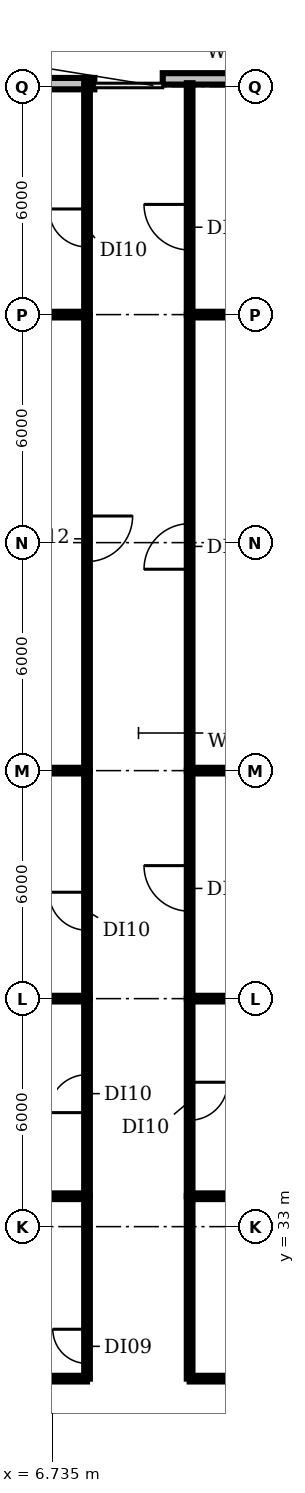
"""IFC4 building model, lengths in metres.
Left out: names, types, materials, properties, quantities, classifications, styles, units other than length and angle.
Written with IfcOpenShell. Run it as: python <this file> out.ifc"""

import sys

from ifc_helpers import new_model, si_unit, direction, frame, frame_2d, origin, place, context, subcontext, project, spatial, rectangle, extrude, element, fill, save


model = new_model("IFC4")
c1 = context("Model", 3, precision=1e-05, world=origin(), true_north=direction((0.0, 1.0)))
c2 = subcontext(c1, "Body", "Model", "MODEL_VIEW")
j1 = project(units=[si_unit("LENGTHUNIT", "METRE"), si_unit("PLANEANGLEUNIT", "RADIAN")], contexts=[c1])
p1 = place(None, origin())
s1 = spatial("IfcSite", under=j1, at=p1, CompositionType="ELEMENT")
p2 = place(p1, origin())
s2 = spatial("IfcBuilding", under=s1, at=p2, CompositionType="ELEMENT")
p3 = place(p2, frame((0.0, 0.0, 264.2)))
s3 = spatial("IfcBuildingStorey", under=s2, at=p3, CompositionType="ELEMENT", Elevation=264.2)
p4 = place(p3, frame((14.357, 63.204, 0.0), z_axis=(0.0, 0.0, 1.0), x_axis=(-1.0, 0.0, 0.0)))
e1 = element("IfcWall", 1, at=p4, inside=s3, PredefinedType="SOLIDWALL", context=c2, shape_type="SweptSolid", body=[
    extrude(rectangle(XDim=4.715, YDim=0.3, at=frame_2d((2.357, 0.0))), origin(), (0.0, 0.0, 1.0), 3.85),
])
p5 = place(p3, frame((7.843, 63.078, 0.0), z_axis=(0.0, 0.0, 1.0), x_axis=(-1.0, 0.0, 0.0)))
e2 = element("IfcWall", 2, at=p5, inside=s3, PredefinedType="SOLIDWALL", context=c2, shape_type="SweptSolid", body=[
    extrude(rectangle(XDim=8.873, YDim=0.3, at=frame_2d((4.436, 0.0))), origin(), (0.0, 0.0, 1.0), 3.85),
])
for number, where, z_axis, x_axis in (
    (3, (-0.98, 33.8, 0.0), (0.0, 0.0, 1.0), (1.0, 0.0, 0.0)),
    (4, (-0.98, 39.0, 0.0), (0.0, 0.0, 1.0), (1.0, 0.0, 0.0)),
    (5, (-0.98, 45.0, 0.0), (0.0, 0.0, 1.0), (1.0, 0.0, 0.0)),
    (6, (-0.98, 57.0, 0.0), (0.0, 0.0, 1.0), (1.0, 0.0, 0.0)),
):
    element("IfcWall", number, at=place(p3, frame(where, z_axis=z_axis, x_axis=x_axis)), inside=s3, PredefinedType="PARTITIONING", context=c2, shape_type="SweptSolid", body=[
        extrude(rectangle(XDim=8.63, YDim=0.15, at=frame_2d((4.315, 0.0))), origin(), (0.0, 0.0, 1.0), 2.9),
    ])
p6 = place(p3, frame((3.0, 29.0, 0.0), z_axis=(0.0, 0.0, 1.0), x_axis=(1.0, 0.0, 0.0)))
e7 = element("IfcWall", 7, at=p6, inside=s3, PredefinedType="PARTITIONING", context=c2, shape_type="SweptSolid", body=[
    extrude(rectangle(XDim=4.65, YDim=0.15, at=frame_2d((2.325, 0.0))), origin(), (0.0, 0.0, 1.0), 2.9),
])
p7 = place(p3, frame((7.65, 29.0, 0.0), z_axis=(0.0, 0.0, 1.0), x_axis=(0.0, 1.0, 0.0)))
e8 = element("IfcWall", 8, at=p7, inside=s3, PredefinedType="PARTITIONING", context=c2, shape_type="SweptSolid", body=[
    extrude(rectangle(XDim=4.8, YDim=0.15, at=frame_2d((2.4, 0.0))), origin(), (0.0, 0.0, 1.0), 2.9),
])
p8 = place(p7, frame((0.4, 0.0, 0.0)))
e9 = element("IfcOpeningElement", 9, at=p8, cuts=e8, PredefinedType="OPENING", context=c2, shape_type="SweptSolid", body=[
    extrude(rectangle(XDim=0.9, YDim=2.1, at=frame_2d((0.45, 1.05))), frame((0.0, 0.085, 0.0), z_axis=(0.0, -1.0, 0.0), x_axis=(1.0, 0.0, 0.0)), (0.0, 0.0, 1.0), 0.17),
])
p9 = place(p3, frame((7.65, 33.8, 0.0), z_axis=(0.0, 0.0, 1.0), x_axis=(0.0, 1.0, 0.0)))
e10 = element("IfcWall", 10, at=p9, inside=s3, PredefinedType="PARTITIONING", context=c2, shape_type="SweptSolid", body=[
    extrude(rectangle(XDim=5.2, YDim=0.15, at=frame_2d((2.6, 0.0))), origin(), (0.0, 0.0, 1.0), 2.9),
])
p10 = place(p9, frame((2.2, 0.0, 0.0)))
e11 = element("IfcOpeningElement", 11, at=p10, cuts=e10, PredefinedType="OPENING", context=c2, shape_type="SweptSolid", body=[
    extrude(rectangle(XDim=1.0, YDim=2.1, at=frame_2d((0.5, 1.05))), frame((0.0, 0.085, 0.0), z_axis=(0.0, -1.0, 0.0), x_axis=(1.0, 0.0, 0.0)), (0.0, 0.0, 1.0), 0.17),
])
p11 = place(p3, frame((7.65, 39.0, 0.0), z_axis=(0.0, 0.0, 1.0), x_axis=(0.0, 1.0, 0.0)))
e12 = element("IfcWall", 12, at=p11, inside=s3, PredefinedType="PARTITIONING", context=c2, shape_type="SweptSolid", body=[
    extrude(rectangle(XDim=6.0, YDim=0.15, at=frame_2d((3.0, 0.0))), origin(), (0.0, 0.0, 1.0), 2.9),
])
p12 = place(p11, frame((1.8, 0.0, 0.0)))
e13 = element("IfcOpeningElement", 13, at=p12, cuts=e12, PredefinedType="OPENING", context=c2, shape_type="SweptSolid", body=[
    extrude(rectangle(XDim=1.0, YDim=2.1, at=frame_2d((0.5, 1.05))), frame((0.0, 0.085, 0.0), z_axis=(0.0, -1.0, 0.0), x_axis=(1.0, 0.0, 0.0)), (0.0, 0.0, 1.0), 0.17),
])
p13 = place(p3, frame((7.65, 57.0, 0.0), z_axis=(0.0, 0.0, 1.0), x_axis=(0.0, -1.0, 0.0)))
e14 = element("IfcWall", 14, at=p13, inside=s3, PredefinedType="PARTITIONING", context=c2, shape_type="SweptSolid", body=[
    extrude(rectangle(XDim=12.0, YDim=0.15, at=frame_2d((6.0, 0.0))), origin(), (0.0, 0.0, 1.0), 2.9),
])
p14 = place(p13, frame((5.3, 0.0, 0.0)))
e15 = element("IfcOpeningElement", 15, at=p14, cuts=e14, PredefinedType="OPENING", context=c2, shape_type="SweptSolid", body=[
    extrude(rectangle(XDim=1.2, YDim=2.1, at=frame_2d((0.6, 1.05))), frame((0.0, 0.085, 0.0), z_axis=(0.0, -1.0, 0.0), x_axis=(1.0, 0.0, 0.0)), (0.0, 0.0, 1.0), 0.17),
])
p15 = place(p3, frame((7.65, 57.0, 0.0), z_axis=(0.0, 0.0, 1.0), x_axis=(0.0, 1.0, 0.0)))
e16 = element("IfcWall", 16, at=p15, inside=s3, PredefinedType="PARTITIONING", context=c2, shape_type="SweptSolid", body=[
    extrude(rectangle(XDim=6.09, YDim=0.15, at=frame_2d((3.045, 0.0))), origin(), (0.0, 0.0, 1.0), 2.9),
])
p16 = place(p15, frame((1.78, 0.0, 0.0)))
e17 = element("IfcOpeningElement", 17, at=p16, cuts=e16, PredefinedType="OPENING", context=c2, shape_type="SweptSolid", body=[
    extrude(rectangle(XDim=1.0, YDim=2.1, at=frame_2d((0.5, 1.05))), frame((0.0, 0.085, 0.0), z_axis=(0.0, -1.0, 0.0), x_axis=(1.0, 0.0, 0.0)), (0.0, 0.0, 1.0), 0.17),
])
p17 = place(p3, frame((10.35, 29.0, 0.0), z_axis=(0.0, 0.0, 1.0), x_axis=(0.0, 1.0, 0.0)))
e18 = element("IfcWall", 18, at=p17, inside=s3, PredefinedType="PARTITIONING", context=c2, shape_type="SweptSolid", body=[
    extrude(rectangle(XDim=4.8, YDim=0.15, at=frame_2d((2.4, 0.0))), origin(), (0.0, 0.0, 1.0), 2.9),
])
p18 = place(p3, frame((10.35, 29.0, 0.0), z_axis=(0.0, 0.0, 1.0), x_axis=(1.0, 0.0, 0.0)))
e19 = element("IfcWall", 19, at=p18, inside=s3, PredefinedType="PARTITIONING", context=c2, shape_type="SweptSolid", body=[
    extrude(rectangle(XDim=4.05, YDim=0.15, at=frame_2d((2.025, 0.0))), origin(), (0.0, 0.0, 1.0), 2.9),
])
p19 = place(p3, frame((10.35, 33.8, 0.0), z_axis=(0.0, 0.0, 1.0), x_axis=(1.0, 0.0, 0.0)))
e20 = element("IfcWall", 20, at=p19, inside=s3, PredefinedType="PARTITIONING", context=c2, shape_type="SweptSolid", body=[
    extrude(rectangle(XDim=11.6, YDim=0.15, at=frame_2d((5.8, 0.0))), origin(), (0.0, 0.0, 1.0), 2.9),
])
p20 = place(p3, frame((10.35, 39.0, 0.0), z_axis=(0.0, 0.0, 1.0), x_axis=(0.0, -1.0, 0.0)))
e21 = element("IfcWall", 21, at=p20, inside=s3, PredefinedType="PARTITIONING", context=c2, shape_type="SweptSolid", body=[
    extrude(rectangle(XDim=5.2, YDim=0.15, at=frame_2d((2.6, 0.0))), origin(), (0.0, 0.0, 1.0), 2.9),
])
p21 = place(p20, frame((2.2, 0.0, 0.0)))
e22 = element("IfcOpeningElement", 22, at=p21, cuts=e21, PredefinedType="OPENING", context=c2, shape_type="SweptSolid", body=[
    extrude(rectangle(XDim=1.0, YDim=2.1, at=frame_2d((0.5, 1.05))), frame((0.0, 0.085, 0.0), z_axis=(0.0, -1.0, 0.0), x_axis=(1.0, 0.0, 0.0)), (0.0, 0.0, 1.0), 0.17),
])
p22 = place(p3, frame((10.35, 39.0, 0.0), z_axis=(0.0, 0.0, 1.0), x_axis=(0.0, 1.0, 0.0)))
e23 = element("IfcWall", 23, at=p22, inside=s3, PredefinedType="PARTITIONING", context=c2, shape_type="SweptSolid", body=[
    extrude(rectangle(XDim=6.0, YDim=0.15, at=frame_2d((3.0, 0.0))), origin(), (0.0, 0.0, 1.0), 2.9),
])
p23 = place(p22, frame((2.3, 0.0, 0.0)))
e24 = element("IfcOpeningElement", 24, at=p23, cuts=e23, PredefinedType="OPENING", context=c2, shape_type="SweptSolid", body=[
    extrude(rectangle(XDim=1.2, YDim=2.1, at=frame_2d((0.6, 1.05))), frame((0.0, 0.085, 0.0), z_axis=(0.0, -1.0, 0.0), x_axis=(1.0, 0.0, 0.0)), (0.0, 0.0, 1.0), 0.17),
])
p24 = place(p3, frame((10.35, 39.0, 0.0), z_axis=(0.0, 0.0, 1.0), x_axis=(1.0, 0.0, 0.0)))
e25 = element("IfcWall", 25, at=p24, inside=s3, PredefinedType="PARTITIONING", context=c2, shape_type="SweptSolid", body=[
    extrude(rectangle(XDim=15.7, YDim=0.15, at=frame_2d((7.85, 0.0))), origin(), (0.0, 0.0, 1.0), 2.9),
])
p25 = place(p3, frame((10.35, 45.0, 0.0), z_axis=(0.0, 0.0, 1.0), x_axis=(0.0, 1.0, 0.0)))
e26 = element("IfcWall", 26, at=p25, inside=s3, PredefinedType="PARTITIONING", context=c2, shape_type="SweptSolid", body=[
    extrude(rectangle(XDim=12.0, YDim=0.15, at=frame_2d((6.0, 0.0))), origin(), (0.0, 0.0, 1.0), 2.9),
])
p26 = place(p25, frame((5.3, 0.0, 0.0)))
e27 = element("IfcOpeningElement", 27, at=p26, cuts=e26, PredefinedType="OPENING", context=c2, shape_type="SweptSolid", body=[
    extrude(rectangle(XDim=1.2, YDim=2.1, at=frame_2d((0.6, 1.05))), frame((0.0, 0.085, 0.0), z_axis=(0.0, -1.0, 0.0), x_axis=(1.0, 0.0, 0.0)), (0.0, 0.0, 1.0), 0.17),
])
p27 = place(p3, frame((10.35, 45.0, 0.0), z_axis=(0.0, 0.0, 1.0), x_axis=(1.0, 0.0, 0.0)))
e28 = element("IfcWall", 28, at=p27, inside=s3, PredefinedType="PARTITIONING", context=c2, shape_type="SweptSolid", body=[
    extrude(rectangle(XDim=16.28, YDim=0.15, at=frame_2d((8.14, 0.0))), origin(), (0.0, 0.0, 1.0), 2.9),
])
p28 = place(p3, frame((10.35, 57.0, 0.0), z_axis=(0.0, 0.0, 1.0), x_axis=(0.0, 1.0, 0.0)))
e29 = element("IfcWall", 29, at=p28, inside=s3, PredefinedType="PARTITIONING", context=c2, shape_type="SweptSolid", body=[
    extrude(rectangle(XDim=6.09, YDim=0.15, at=frame_2d((3.045, 0.0))), origin(), (0.0, 0.0, 1.0), 2.9),
])
p29 = place(p28, frame((1.7, 0.0, 0.0)))
e30 = element("IfcOpeningElement", 30, at=p29, cuts=e29, PredefinedType="OPENING", context=c2, shape_type="SweptSolid", body=[
    extrude(rectangle(XDim=1.2, YDim=2.1, at=frame_2d((0.6, 1.05))), frame((0.0, 0.085, 0.0), z_axis=(0.0, -1.0, 0.0), x_axis=(1.0, 0.0, 0.0)), (0.0, 0.0, 1.0), 0.17),
])
p30 = place(p3, frame((10.35, 57.0, 0.0), z_axis=(0.0, 0.0, 1.0), x_axis=(1.0, 0.0, 0.0)))
e31 = element("IfcWall", 31, at=p30, inside=s3, PredefinedType="PARTITIONING", context=c2, shape_type="SweptSolid", body=[
    extrude(rectangle(XDim=16.65, YDim=0.15, at=frame_2d((8.325, 0.0))), origin(), (0.0, 0.0, 1.0), 2.9),
])
p31 = place(p8, origin())
e32 = element("IfcDoor", 32, at=p31, inside=s3, OperationType="SINGLE_SWING_RIGHT", PredefinedType="DOOR", context=c2, shape_type="SweptSolid", body=[
    extrude(rectangle(XDim=0.9, YDim=2.1, at=frame_2d((0.45, 1.05))), frame((0.0, 0.025, 0.0), z_axis=(0.0, -1.0, 0.0), x_axis=(1.0, 0.0, 0.0)), (0.0, 0.0, 1.0), 0.05),
])
fill(e9, e32)
p32 = place(p10, origin())
e33 = element("IfcDoor", 33, at=p32, inside=s3, OperationType="SINGLE_SWING_LEFT", PredefinedType="DOOR", context=c2, shape_type="SweptSolid", body=[
    extrude(rectangle(XDim=1.0, YDim=2.1, at=frame_2d((0.5, 1.05))), frame((0.0, 0.025, 0.0), z_axis=(0.0, -1.0, 0.0), x_axis=(1.0, 0.0, 0.0)), (0.0, 0.0, 1.0), 0.05),
])
fill(e11, e33)
p33 = place(p12, origin())
e34 = element("IfcDoor", 34, at=p33, inside=s3, OperationType="SINGLE_SWING_RIGHT", PredefinedType="DOOR", context=c2, shape_type="SweptSolid", body=[
    extrude(rectangle(XDim=1.0, YDim=2.1, at=frame_2d((0.5, 1.05))), frame((0.0, 0.025, 0.0), z_axis=(0.0, -1.0, 0.0), x_axis=(1.0, 0.0, 0.0)), (0.0, 0.0, 1.0), 0.05),
])
fill(e13, e34)
p34 = place(p14, origin())
e35 = element("IfcDoor", 35, at=p34, inside=s3, OperationType="SINGLE_SWING_LEFT", PredefinedType="DOOR", context=c2, shape_type="SweptSolid", body=[
    extrude(rectangle(XDim=1.2, YDim=2.1, at=frame_2d((0.6, 1.05))), frame((0.0, 0.025, 0.0), z_axis=(0.0, -1.0, 0.0), x_axis=(1.0, 0.0, 0.0)), (0.0, 0.0, 1.0), 0.05),
])
fill(e15, e35)
p35 = place(p16, origin())
e36 = element("IfcDoor", 36, at=p35, inside=s3, OperationType="SINGLE_SWING_RIGHT", PredefinedType="DOOR", context=c2, shape_type="SweptSolid", body=[
    extrude(rectangle(XDim=1.0, YDim=2.1, at=frame_2d((0.5, 1.05))), frame((0.0, 0.025, 0.0), z_axis=(0.0, -1.0, 0.0), x_axis=(1.0, 0.0, 0.0)), (0.0, 0.0, 1.0), 0.05),
])
fill(e17, e36)
p36 = place(p21, origin())
e37 = element("IfcDoor", 37, at=p36, inside=s3, OperationType="SINGLE_SWING_LEFT", PredefinedType="DOOR", context=c2, shape_type="SweptSolid", body=[
    extrude(rectangle(XDim=1.0, YDim=2.1, at=frame_2d((0.5, 1.05))), frame((0.0, 0.025, 0.0), z_axis=(0.0, -1.0, 0.0), x_axis=(1.0, 0.0, 0.0)), (0.0, 0.0, 1.0), 0.05),
])
fill(e22, e37)
p37 = place(p23, origin())
e38 = element("IfcDoor", 38, at=p37, inside=s3, OperationType="SINGLE_SWING_RIGHT", PredefinedType="DOOR", context=c2, shape_type="SweptSolid", body=[
    extrude(rectangle(XDim=1.2, YDim=2.1, at=frame_2d((0.6, 1.05))), frame((0.0, 0.025, 0.0), z_axis=(0.0, -1.0, 0.0), x_axis=(1.0, 0.0, 0.0)), (0.0, 0.0, 1.0), 0.05),
])
fill(e24, e38)
p38 = place(p26, origin())
e39 = element("IfcDoor", 39, at=p38, inside=s3, OperationType="SINGLE_SWING_LEFT", PredefinedType="DOOR", context=c2, shape_type="SweptSolid", body=[
    extrude(rectangle(XDim=1.2, YDim=2.1, at=frame_2d((0.6, 1.05))), frame((0.0, 0.025, 0.0), z_axis=(0.0, -1.0, 0.0), x_axis=(1.0, 0.0, 0.0)), (0.0, 0.0, 1.0), 0.05),
])
fill(e27, e39)
p39 = place(p29, origin())
e40 = element("IfcDoor", 40, at=p39, inside=s3, OperationType="SINGLE_SWING_RIGHT", PredefinedType="DOOR", context=c2, shape_type="SweptSolid", body=[
    extrude(rectangle(XDim=1.2, YDim=2.1, at=frame_2d((0.6, 1.05))), frame((0.0, 0.025, 0.0), z_axis=(0.0, -1.0, 0.0), x_axis=(1.0, 0.0, 0.0)), (0.0, 0.0, 1.0), 0.05),
])
fill(e30, e40)
save(model, sys.argv[1])
